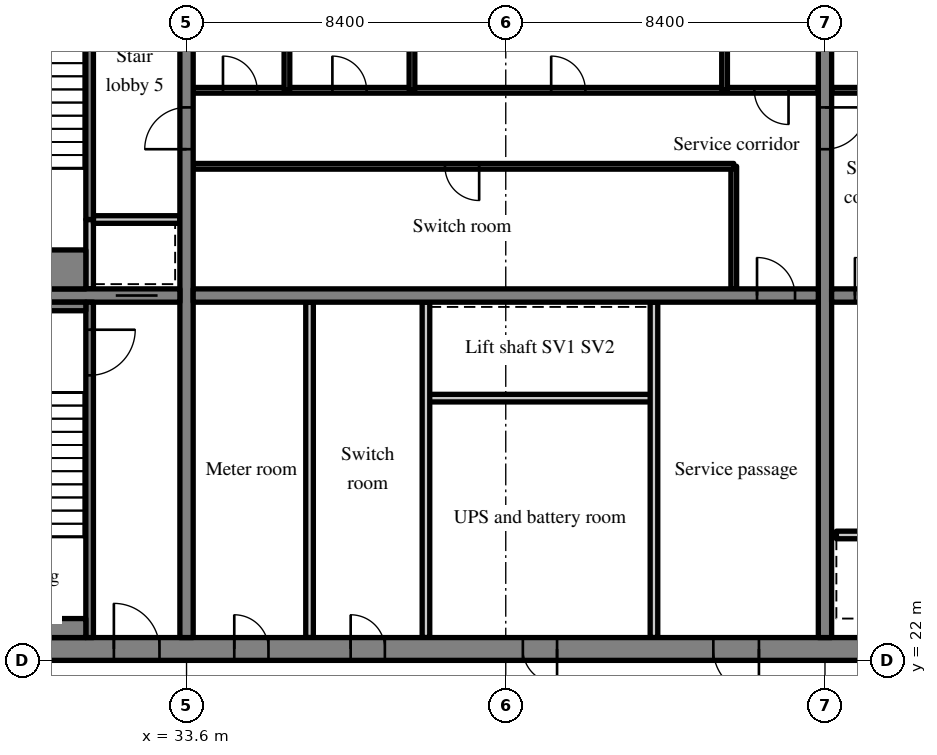
"""IFC4 building model, lengths in metres.
Left out: names, types, materials, properties, quantities, classifications, styles, units other than length and angle.
Written with IfcOpenShell. Run it as: python <this file> out.ifc"""

import sys

from ifc_helpers import new_model, si_unit, direction, frame, frame_2d, origin, place, context, subcontext, project, spatial, rectangle, extrude, source, transform, mapped, element, fill, save


model = new_model("IFC4")
c1 = context("Model", 3, precision=1e-05, world=origin(), true_north=direction((0.0, 1.0)))
c2 = subcontext(c1, "Body", "Model", "MODEL_VIEW")
j1 = project(units=[si_unit("LENGTHUNIT", "METRE"), si_unit("PLANEANGLEUNIT", "RADIAN")], contexts=[c1])
p1 = place(None, origin())
s1 = spatial("IfcSite", under=j1, at=p1, CompositionType="ELEMENT")
p2 = place(p1, origin())
s2 = spatial("IfcBuilding", under=s1, at=p2, CompositionType="ELEMENT")
p3 = place(p2, frame((0.0, 0.0, 206.4)))
s3 = spatial("IfcBuildingStorey", under=s2, at=p3, CompositionType="ELEMENT", Elevation=206.4)
m1 = source(origin(), c2, "Body", "SweptSolid", [
    extrude(rectangle(XDim=50.4, YDim=0.6, at=frame_2d((25.2, 0.0))), origin(), (0.0, 0.0, 1.0), 7.32),
])
p4 = place(p3, frame((25.2, 22.3, 0.0), z_axis=(0.0, 0.0, 1.0), x_axis=(1.0, 0.0, 0.0)))
e1 = element("IfcWall", 1, at=p4, inside=s3, PredefinedType="SHEAR", context=c2, shape_type="MappedRepresentation", body=[
    mapped(m1, transform((0.0, 0.0, 0.0), scale=1.0)),
])
m2 = source(origin(), c2, "Body", "SweptSolid", [
    extrude(rectangle(XDim=1.2, YDim=2.1, at=frame_2d((0.6, 1.05))), frame((0.0, 0.31, 0.0), z_axis=(0.0, -1.0, 0.0), x_axis=(1.0, 0.0, 0.0)), (0.0, 0.0, 1.0), 0.62),
])
p5 = place(p4, frame((22.262, 0.0, 0.0)))
e2 = element("IfcOpeningElement", 2, at=p5, cuts=e1, PredefinedType="OPENING", context=c2, shape_type="MappedRepresentation", body=[
    mapped(m2, transform((0.0, 0.0, 0.0), scale=1.0)),
])
m3 = source(origin(), c2, "Body", "SweptSolid", [
    extrude(rectangle(XDim=0.9, YDim=2.1, at=frame_2d((0.45, 1.05))), frame((0.0, 0.31, 0.0), z_axis=(0.0, -1.0, 0.0), x_axis=(1.0, 0.0, 0.0)), (0.0, 0.0, 1.0), 0.62),
])
p6 = place(p4, frame((17.25, 0.0, 0.0)))
e3 = element("IfcOpeningElement", 3, at=p6, cuts=e1, PredefinedType="OPENING", context=c2, shape_type="MappedRepresentation", body=[
    mapped(m3, transform((0.0, 0.0, 0.0), scale=1.0)),
])
p7 = place(p4, frame((9.656, 0.0, 0.0)))
e4 = element("IfcOpeningElement", 4, at=p7, cuts=e1, PredefinedType="OPENING", context=c2, shape_type="MappedRepresentation", body=[
    mapped(m3, transform((0.0, 0.0, 0.0), scale=1.0)),
])
p8 = place(p4, frame((12.719, 0.0, 0.0)))
e5 = element("IfcOpeningElement", 5, at=p8, cuts=e1, PredefinedType="OPENING", context=c2, shape_type="MappedRepresentation", body=[
    mapped(m3, transform((0.0, 0.0, 0.0), scale=1.0)),
])
m4 = source(origin(), c2, "Body", "SweptSolid", [
    extrude(rectangle(XDim=1.8, YDim=2.1, at=frame_2d((0.9, 1.05))), frame((0.0, 0.31, 0.0), z_axis=(0.0, -1.0, 0.0), x_axis=(1.0, 0.0, 0.0)), (0.0, 0.0, 1.0), 0.62),
])
p9 = place(p4, frame((32.7, 0.0, 0.0)))
e6 = element("IfcOpeningElement", 6, at=p9, cuts=e1, PredefinedType="OPENING", context=c2, shape_type="MappedRepresentation", body=[
    mapped(m4, transform((0.0, 0.0, 0.0), scale=1.0)),
])
p10 = place(p4, frame((6.488, 0.0, 0.0)))
e7 = element("IfcOpeningElement", 7, at=p10, cuts=e1, PredefinedType="OPENING", context=c2, shape_type="MappedRepresentation", body=[
    mapped(m2, transform((0.0, 0.0, 0.0), scale=1.0)),
])
p11 = place(p4, frame((47.925, 0.0, 0.0)))
e8 = element("IfcOpeningElement", 8, at=p11, cuts=e1, PredefinedType="OPENING", context=c2, shape_type="MappedRepresentation", body=[
    mapped(m2, transform((0.0, 0.0, 0.0), scale=1.0)),
])
m5 = source(origin(), c2, "Body", "SweptSolid", [
    extrude(rectangle(XDim=18.8, YDim=0.35, at=frame_2d((9.4, 0.0))), origin(), (0.0, 0.0, 1.0), 7.32),
])
p12 = place(p3, frame((33.6, 22.6, 0.0), z_axis=(0.0, 0.0, 1.0), x_axis=(0.0, 1.0, 0.0)))
e9 = element("IfcWall", 9, at=p12, inside=s3, PredefinedType="SHEAR", context=c2, shape_type="MappedRepresentation", body=[
    mapped(m5, transform((0.0, 0.0, 0.0), scale=1.0)),
])
m6 = source(origin(), c2, "Body", "SweptSolid", [
    extrude(rectangle(XDim=1.1, YDim=2.1, at=frame_2d((0.55, 1.05))), frame((0.0, 0.185, 0.0), z_axis=(0.0, -1.0, 0.0), x_axis=(1.0, 0.0, 0.0)), (0.0, 0.0, 1.0), 0.37),
])
p13 = place(p12, frame((12.85, 0.0, 0.0)))
e10 = element("IfcOpeningElement", 10, at=p13, cuts=e9, PredefinedType="OPENING", context=c2, shape_type="MappedRepresentation", body=[
    mapped(m6, transform((0.0, 0.0, 0.0), scale=1.0)),
])
p14 = place(p3, frame((50.4, 22.6, 0.0), z_axis=(0.0, 0.0, 1.0), x_axis=(0.0, 1.0, 0.0)))
e11 = element("IfcWall", 11, at=p14, inside=s3, PredefinedType="SHEAR", context=c2, shape_type="MappedRepresentation", body=[
    mapped(m5, transform((0.0, 0.0, 0.0), scale=1.0)),
])
p15 = place(p14, frame((12.85, 0.0, 0.0)))
e12 = element("IfcOpeningElement", 12, at=p15, cuts=e11, PredefinedType="OPENING", context=c2, shape_type="MappedRepresentation", body=[
    mapped(m6, transform((0.0, 0.0, 0.0), scale=1.0)),
])
m7 = source(origin(), c2, "Body", "SweptSolid", [
    extrude(rectangle(XDim=7.625, YDim=0.35, at=frame_2d((3.812, 0.0))), origin(), (0.0, 0.0, 1.0), 7.32),
])
p16 = place(p3, frame((25.8, 31.6, 0.0), z_axis=(0.0, 0.0, 1.0), x_axis=(1.0, 0.0, 0.0)))
e13 = element("IfcWall", 13, at=p16, inside=s3, PredefinedType="SHEAR", context=c2, shape_type="MappedRepresentation", body=[
    mapped(m7, transform((0.0, 0.0, 0.0), scale=1.0)),
])
p17 = place(p16, frame((5.938, 0.0, 0.0)))
e14 = element("IfcOpeningElement", 14, at=p17, cuts=e13, PredefinedType="OPENING", context=c2, shape_type="MappedRepresentation", body=[
    mapped(m6, transform((0.0, 0.0, 0.0), scale=1.0)),
])
m8 = source(origin(), c2, "Body", "SweptSolid", [
    extrude(rectangle(XDim=16.45, YDim=0.35, at=frame_2d((8.225, 0.0))), origin(), (0.0, 0.0, 1.0), 7.32),
])
p18 = place(p3, frame((33.775, 31.6, 0.0), z_axis=(0.0, 0.0, 1.0), x_axis=(1.0, 0.0, 0.0)))
e15 = element("IfcWall", 15, at=p18, inside=s3, PredefinedType="SHEAR", context=c2, shape_type="MappedRepresentation", body=[
    mapped(m8, transform((0.0, 0.0, 0.0), scale=1.0)),
])
m9 = source(origin(), c2, "Body", "SweptSolid", [
    extrude(rectangle(XDim=1.0, YDim=2.1, at=frame_2d((0.5, 1.05))), frame((0.0, 0.185, 0.0), z_axis=(0.0, -1.0, 0.0), x_axis=(1.0, 0.0, 0.0)), (0.0, 0.0, 1.0), 0.37),
])
p19 = place(p18, frame((14.837, 0.0, 0.0)))
e16 = element("IfcOpeningElement", 16, at=p19, cuts=e15, PredefinedType="OPENING", context=c2, shape_type="MappedRepresentation", body=[
    mapped(m9, transform((0.0, 0.0, 0.0), scale=1.0)),
])
m10 = source(origin(), c2, "Body", "SweptSolid", [
    extrude(rectangle(XDim=16.45, YDim=0.35, at=frame_2d((8.225, 0.0))), origin(), (0.0, 0.0, 1.0), 7.32),
])
p20 = place(p3, frame((50.575, 31.6, 0.0), z_axis=(0.0, 0.0, 1.0), x_axis=(1.0, 0.0, 0.0)))
e17 = element("IfcWall", 17, at=p20, inside=s3, PredefinedType="SHEAR", context=c2, shape_type="MappedRepresentation", body=[
    mapped(m10, transform((0.0, 0.0, 0.0), scale=1.0)),
])
p21 = place(p20, frame((0.613, 0.0, 0.0)))
e18 = element("IfcOpeningElement", 18, at=p21, cuts=e17, PredefinedType="OPENING", context=c2, shape_type="MappedRepresentation", body=[
    mapped(m9, transform((0.0, 0.0, 0.0), scale=1.0)),
])
m11 = source(origin(), c2, "Body", "SweptSolid", [
    extrude(rectangle(XDim=6.0, YDim=0.2, at=frame_2d((3.0, 0.0))), origin(), (0.0, 0.0, 1.0), 7.32),
])
p22 = place(p3, frame((39.9, 28.9, 0.0), z_axis=(0.0, 0.0, 1.0), x_axis=(1.0, 0.0, 0.0)))
e19 = element("IfcWall", 19, at=p22, inside=s3, PredefinedType="SOLIDWALL", context=c2, shape_type="MappedRepresentation", body=[
    mapped(m11, transform((0.0, 0.0, 0.0), scale=1.0)),
])
m12 = source(origin(), c2, "Body", "SweptSolid", [
    extrude(rectangle(XDim=8.825, YDim=0.2, at=frame_2d((4.413, 0.0))), origin(), (0.0, 0.0, 1.0), 7.32),
])
for number, where, z_axis, x_axis in (
    (20, (45.9, 22.6, 0.0), (0.0, 0.0, 1.0), (0.0, 1.0, 0.0)),
    (21, (39.9, 22.6, 0.0), (0.0, 0.0, 1.0), (0.0, 1.0, 0.0)),
    (22, (36.837, 22.6, 0.0), (0.0, 0.0, 1.0), (0.0, 1.0, 0.0)),
):
    element("IfcWall", number, at=place(p3, frame(where, z_axis=z_axis, x_axis=x_axis)), inside=s3, PredefinedType="PARTITIONING", context=c2, shape_type="MappedRepresentation", body=[
        mapped(m12, transform((0.0, 0.0, 0.0), scale=1.0)),
    ])
m13 = source(origin(), c2, "Body", "SweptSolid", [
    extrude(rectangle(XDim=3.225, YDim=0.15, at=frame_2d((1.613, 0.0))), origin(), (0.0, 0.0, 1.0), 7.32),
])
p23 = place(p3, frame((48.0, 31.775, 0.0), z_axis=(0.0, 0.0, 1.0), x_axis=(0.0, 1.0, 0.0)))
e23 = element("IfcWall", 23, at=p23, inside=s3, PredefinedType="PARTITIONING", context=c2, shape_type="MappedRepresentation", body=[
    mapped(m13, transform((0.0, 0.0, 0.0), scale=1.0)),
])
m14 = source(origin(), c2, "Body", "SweptSolid", [
    extrude(rectangle(XDim=14.225, YDim=0.15, at=frame_2d((7.113, 0.0))), origin(), (0.0, 0.0, 1.0), 7.32),
])
p24 = place(p3, frame((33.775, 35.0, 0.0), z_axis=(0.0, 0.0, 1.0), x_axis=(1.0, 0.0, 0.0)))
e24 = element("IfcWall", 24, at=p24, inside=s3, PredefinedType="PARTITIONING", context=c2, shape_type="MappedRepresentation", body=[
    mapped(m14, transform((0.0, 0.0, 0.0), scale=1.0)),
])
m15 = source(origin(), c2, "Body", "SweptSolid", [
    extrude(rectangle(XDim=0.9, YDim=2.1, at=frame_2d((0.45, 1.05))), frame((0.0, 0.085, 0.0), z_axis=(0.0, -1.0, 0.0), x_axis=(1.0, 0.0, 0.0)), (0.0, 0.0, 1.0), 0.17),
])
p25 = place(p24, frame((6.625, 0.0, 0.0)))
e25 = element("IfcOpeningElement", 25, at=p25, cuts=e24, PredefinedType="OPENING", context=c2, shape_type="MappedRepresentation", body=[
    mapped(m15, transform((0.0, 0.0, 0.0), scale=1.0)),
])
m16 = source(origin(), c2, "Body", "SweptSolid", [
    extrude(rectangle(XDim=16.45, YDim=0.15, at=frame_2d((8.225, 0.0))), origin(), (0.0, 0.0, 1.0), 7.32),
])
p26 = place(p3, frame((33.775, 37.0, 0.0), z_axis=(0.0, 0.0, 1.0), x_axis=(1.0, 0.0, 0.0)))
e26 = element("IfcWall", 26, at=p26, inside=s3, PredefinedType="PARTITIONING", context=c2, shape_type="MappedRepresentation", body=[
    mapped(m16, transform((0.0, 0.0, 0.0), scale=1.0)),
])
p27 = place(p26, frame((0.784, 0.0, 0.0)))
e27 = element("IfcOpeningElement", 27, at=p27, cuts=e26, PredefinedType="OPENING", context=c2, shape_type="MappedRepresentation", body=[
    mapped(m15, transform((0.0, 0.0, 0.0), scale=1.0)),
])
p28 = place(p26, frame((3.663, 0.0, 0.0)))
e28 = element("IfcOpeningElement", 28, at=p28, cuts=e26, PredefinedType="OPENING", context=c2, shape_type="MappedRepresentation", body=[
    mapped(m15, transform((0.0, 0.0, 0.0), scale=1.0)),
])
p29 = place(p26, frame((9.42, 0.0, 0.0)))
e29 = element("IfcOpeningElement", 29, at=p29, cuts=e26, PredefinedType="OPENING", context=c2, shape_type="MappedRepresentation", body=[
    mapped(m15, transform((0.0, 0.0, 0.0), scale=1.0)),
])
p30 = place(p26, frame((14.766, 0.0, 0.0)))
e30 = element("IfcOpeningElement", 30, at=p30, cuts=e26, PredefinedType="OPENING", context=c2, shape_type="MappedRepresentation", body=[
    mapped(m15, transform((0.0, 0.0, 0.0), scale=1.0)),
])
m17 = source(origin(), c2, "Body", "SweptSolid", [
    extrude(rectangle(XDim=4.4, YDim=0.15, at=frame_2d((2.2, 0.0))), origin(), (0.0, 0.0, 1.0), 7.32),
])
for number, where, z_axis, x_axis in (
    (31, (36.242, 37.0, 0.0), (0.0, 0.0, 1.0), (0.0, 1.0, 0.0)),
    (32, (39.532, 37.0, 0.0), (0.0, 0.0, 1.0), (0.0, 1.0, 0.0)),
    (33, (47.758, 37.0, 0.0), (0.0, 0.0, 1.0), (0.0, 1.0, 0.0)),
):
    element("IfcWall", number, at=place(p3, frame(where, z_axis=z_axis, x_axis=x_axis)), inside=s3, PredefinedType="PARTITIONING", context=c2, shape_type="MappedRepresentation", body=[
        mapped(m17, transform((0.0, 0.0, 0.0), scale=1.0)),
    ])
p31 = place(p3, frame((56.7, 25.3, 0.0), z_axis=(0.0, 0.0, 1.0), x_axis=(-1.0, 0.0, 0.0)))
e34 = element("IfcWall", 34, at=p31, inside=s3, PredefinedType="SOLIDWALL", context=c2, shape_type="MappedRepresentation", body=[
    mapped(m11, transform((0.0, 0.0, 0.0), scale=1.0)),
])
m18 = source(origin(), c2, "Body", "SweptSolid", [
    extrude(rectangle(XDim=16.45, YDim=0.15, at=frame_2d((8.225, 0.0))), origin(), (0.0, 0.0, 1.0), 7.32),
])
p32 = place(p3, frame((67.025, 37.0, 0.0), z_axis=(0.0, 0.0, 1.0), x_axis=(-1.0, 0.0, 0.0)))
e35 = element("IfcWall", 35, at=p32, inside=s3, PredefinedType="PARTITIONING", context=c2, shape_type="MappedRepresentation", body=[
    mapped(m18, transform((0.0, 0.0, 0.0), scale=1.0)),
])
p33 = place(p32, frame((6.541, 0.0, 0.0)))
e36 = element("IfcOpeningElement", 36, at=p33, cuts=e35, PredefinedType="OPENING", context=c2, shape_type="MappedRepresentation", body=[
    mapped(m15, transform((0.0, 0.0, 0.0), scale=1.0)),
])
p34 = place(p32, frame((14.766, 0.0, 0.0)))
e37 = element("IfcOpeningElement", 37, at=p34, cuts=e35, PredefinedType="OPENING", context=c2, shape_type="MappedRepresentation", body=[
    mapped(m15, transform((0.0, 0.0, 0.0), scale=1.0)),
])
m19 = source(origin(), c2, "Body", "SweptSolid", [
    extrude(rectangle(XDim=8.825, YDim=0.2, at=frame_2d((4.413, 0.0))), origin(), (0.0, 0.0, 1.0), 7.32),
])
p35 = place(p3, frame((31.05, 22.6, 0.0), z_axis=(0.0, 0.0, 1.0), x_axis=(0.0, 1.0, 0.0)))
e38 = element("IfcWall", 38, at=p35, inside=s3, PredefinedType="SOLIDWALL", context=c2, shape_type="MappedRepresentation", body=[
    mapped(m19, transform((0.0, 0.0, 0.0), scale=1.0)),
])
m20 = source(origin(), c2, "Body", "SweptSolid", [
    extrude(rectangle(XDim=1.2, YDim=2.1, at=frame_2d((0.6, 1.05))), frame((0.0, 0.11, 0.0), z_axis=(0.0, -1.0, 0.0), x_axis=(1.0, 0.0, 0.0)), (0.0, 0.0, 1.0), 0.22),
])
p36 = place(p35, frame((6.9, 0.0, 0.0)))
e39 = element("IfcOpeningElement", 39, at=p36, cuts=e38, PredefinedType="OPENING", context=c2, shape_type="MappedRepresentation", body=[
    mapped(m20, transform((0.0, 0.0, 0.0), scale=1.0)),
])
m21 = source(origin(), c2, "Body", "SweptSolid", [
    extrude(rectangle(XDim=1.825, YDim=0.2, at=frame_2d((0.913, 0.0))), origin(), (0.0, 0.0, 1.0), 7.32),
])
p37 = place(p3, frame((31.05, 31.775, 0.0), z_axis=(0.0, 0.0, 1.0), x_axis=(0.0, 1.0, 0.0)))
e40 = element("IfcWall", 40, at=p37, inside=s3, PredefinedType="SOLIDWALL", context=c2, shape_type="MappedRepresentation", body=[
    mapped(m21, transform((0.0, 0.0, 0.0), scale=1.0)),
])
m22 = source(origin(), c2, "Body", "SweptSolid", [
    extrude(rectangle(XDim=2.275, YDim=0.2, at=frame_2d((1.138, 0.0))), origin(), (0.0, 0.0, 1.0), 7.32),
])
p38 = place(p3, frame((31.15, 33.6, 0.0), z_axis=(0.0, 0.0, 1.0), x_axis=(1.0, 0.0, 0.0)))
e41 = element("IfcWall", 41, at=p38, inside=s3, PredefinedType="SOLIDWALL", context=c2, shape_type="MappedRepresentation", body=[
    mapped(m22, transform((0.0, 0.0, 0.0), scale=1.0)),
])
m23 = source(origin(), c2, "Body", "SweptSolid", [
    extrude(rectangle(XDim=7.8, YDim=0.2, at=frame_2d((3.9, 0.0))), origin(), (0.0, 0.0, 1.0), 7.32),
])
p39 = place(p3, frame((31.05, 33.6, 0.0), z_axis=(0.0, 0.0, 1.0), x_axis=(0.0, 1.0, 0.0)))
e42 = element("IfcWall", 42, at=p39, inside=s3, PredefinedType="SOLIDWALL", context=c2, shape_type="MappedRepresentation", body=[
    mapped(m23, transform((0.0, 0.0, 0.0), scale=1.0)),
])
m24 = source(origin(), c2, "Body", "SweptSolid", [
    extrude(rectangle(XDim=1.8, YDim=2.1, at=frame_2d((0.9, 1.05))), frame((0.0, 0.11, 0.0), z_axis=(0.0, -1.0, 0.0), x_axis=(1.0, 0.0, 0.0)), (0.0, 0.0, 1.0), 0.22),
])
p40 = place(p39, frame((5.3, 0.0, 0.0)))
e43 = element("IfcOpeningElement", 43, at=p40, cuts=e42, PredefinedType="OPENING", context=c2, shape_type="MappedRepresentation", body=[
    mapped(m24, transform((0.0, 0.0, 0.0), scale=1.0)),
])
m25 = source(origin(), c2, "Body", "SweptSolid", [
    extrude(rectangle(XDim=5.15, YDim=0.5, at=frame_2d((2.575, 0.0))), origin(), (0.0, 0.0, 1.0), 7.32),
])
p41 = place(p3, frame((25.8, 22.85, 0.0), z_axis=(0.0, 0.0, 1.0), x_axis=(1.0, 0.0, 0.0)))
e44 = element("IfcWall", 44, at=p41, inside=s3, PredefinedType="SOLIDWALL", context=c2, shape_type="MappedRepresentation", body=[
    mapped(m25, transform((0.0, 0.0, 0.0), scale=1.0)),
])
m26 = source(origin(), c2, "Body", "SweptSolid", [
    extrude(rectangle(XDim=5.15, YDim=0.225, at=frame_2d((2.575, 0.0))), origin(), (0.0, 0.0, 1.0), 7.32),
])
p42 = place(p3, frame((25.8, 31.312, 0.0), z_axis=(0.0, 0.0, 1.0), x_axis=(1.0, 0.0, 0.0)))
e45 = element("IfcWall", 45, at=p42, inside=s3, PredefinedType="SOLIDWALL", context=c2, shape_type="MappedRepresentation", body=[
    mapped(m26, transform((0.0, 0.0, 0.0), scale=1.0)),
])
m27 = source(origin(), c2, "Body", "SweptSolid", [
    extrude(rectangle(XDim=5.15, YDim=1.025, at=frame_2d((2.575, 0.0))), origin(), (0.0, 0.0, 1.0), 7.32),
])
p43 = place(p3, frame((25.8, 32.287, 0.0), z_axis=(0.0, 0.0, 1.0), x_axis=(1.0, 0.0, 0.0)))
e46 = element("IfcWall", 46, at=p43, inside=s3, PredefinedType="SOLIDWALL", context=c2, shape_type="MappedRepresentation", body=[
    mapped(m27, transform((0.0, 0.0, 0.0), scale=1.0)),
])
m28 = source(origin(), c2, "Body", "SweptSolid", [
    extrude(rectangle(XDim=1.2, YDim=2.1, at=frame_2d((0.6, 1.05))), frame((0.0, 0.225, 0.0), z_axis=(0.0, -1.0, 0.0), x_axis=(1.0, 0.0, 0.0)), (0.0, 0.0, 1.0), 0.05),
])
p44 = place(p5, origin())
e47 = element("IfcDoor", 47, at=p44, inside=s3, OperationType="SINGLE_SWING_RIGHT", PredefinedType="DOOR", context=c2, shape_type="MappedRepresentation", body=[
    mapped(m28, transform((0.0, 0.0, 0.0), scale=1.0)),
])
fill(e2, e47)
m29 = source(origin(), c2, "Body", "SweptSolid", [
    extrude(rectangle(XDim=1.0, YDim=2.1, at=frame_2d((0.5, 1.05))), frame((0.0, 0.025, 0.0), z_axis=(0.0, -1.0, 0.0), x_axis=(1.0, 0.0, 0.0)), (0.0, 0.0, 1.0), 0.05),
])
p45 = place(p19, origin())
e48 = element("IfcDoor", 48, at=p45, inside=s3, OperationType="SINGLE_SWING_LEFT", PredefinedType="DOOR", context=c2, shape_type="MappedRepresentation", body=[
    mapped(m29, transform((0.0, 0.0, 0.0), scale=1.0)),
])
fill(e16, e48)
m30 = source(origin(), c2, "Body", "SweptSolid", [
    extrude(rectangle(XDim=0.9, YDim=2.1, at=frame_2d((0.45, 1.05))), frame((0.0, 0.225, 0.0), z_axis=(0.0, -1.0, 0.0), x_axis=(1.0, 0.0, 0.0)), (0.0, 0.0, 1.0), 0.05),
])
p46 = place(p6, origin())
e49 = element("IfcDoor", 49, at=p46, inside=s3, OperationType="SINGLE_SWING_RIGHT", PredefinedType="DOOR", context=c2, shape_type="MappedRepresentation", body=[
    mapped(m30, transform((0.0, 0.0, 0.0), scale=1.0)),
])
fill(e3, e49)
p47 = place(p7, origin())
e50 = element("IfcDoor", 50, at=p47, inside=s3, OperationType="SINGLE_SWING_LEFT", PredefinedType="DOOR", context=c2, shape_type="MappedRepresentation", body=[
    mapped(m30, transform((0.0, 0.0, 0.0), scale=1.0)),
])
fill(e4, e50)
p48 = place(p8, origin())
e51 = element("IfcDoor", 51, at=p48, inside=s3, OperationType="SINGLE_SWING_LEFT", PredefinedType="DOOR", context=c2, shape_type="MappedRepresentation", body=[
    mapped(m30, transform((0.0, 0.0, 0.0), scale=1.0)),
])
fill(e5, e51)
m31 = source(origin(), c2, "Body", "SweptSolid", [
    extrude(rectangle(XDim=0.9, YDim=2.1, at=frame_2d((0.45, 1.05))), frame((0.0, 0.025, 0.0), z_axis=(0.0, -1.0, 0.0), x_axis=(1.0, 0.0, 0.0)), (0.0, 0.0, 1.0), 0.05),
])
p49 = place(p25, origin())
e52 = element("IfcDoor", 52, at=p49, inside=s3, OperationType="SINGLE_SWING_RIGHT", PredefinedType="DOOR", context=c2, shape_type="MappedRepresentation", body=[
    mapped(m31, transform((0.0, 0.0, 0.0), scale=1.0)),
])
fill(e25, e52)
p50 = place(p27, origin())
e53 = element("IfcDoor", 53, at=p50, inside=s3, OperationType="SINGLE_SWING_LEFT", PredefinedType="DOOR", context=c2, shape_type="MappedRepresentation", body=[
    mapped(m31, transform((0.0, 0.0, 0.0), scale=1.0)),
])
fill(e27, e53)
p51 = place(p28, origin())
e54 = element("IfcDoor", 54, at=p51, inside=s3, OperationType="SINGLE_SWING_LEFT", PredefinedType="DOOR", context=c2, shape_type="MappedRepresentation", body=[
    mapped(m31, transform((0.0, 0.0, 0.0), scale=1.0)),
])
fill(e28, e54)
p52 = place(p29, origin())
e55 = element("IfcDoor", 55, at=p52, inside=s3, OperationType="SINGLE_SWING_LEFT", PredefinedType="DOOR", context=c2, shape_type="MappedRepresentation", body=[
    mapped(m31, transform((0.0, 0.0, 0.0), scale=1.0)),
])
fill(e29, e55)
p53 = place(p30, origin())
e56 = element("IfcDoor", 56, at=p53, inside=s3, OperationType="SINGLE_SWING_RIGHT", PredefinedType="DOOR", context=c2, shape_type="MappedRepresentation", body=[
    mapped(m31, transform((0.0, 0.0, 0.0), scale=1.0)),
])
fill(e30, e56)
p54 = place(p21, origin())
e57 = element("IfcDoor", 57, at=p54, inside=s3, OperationType="SINGLE_SWING_LEFT", PredefinedType="DOOR", context=c2, shape_type="MappedRepresentation", body=[
    mapped(m29, transform((0.0, 0.0, 0.0), scale=1.0)),
])
fill(e18, e57)
m32 = source(origin(), c2, "Body", "SweptSolid", [
    extrude(rectangle(XDim=1.2, YDim=2.1, at=frame_2d((0.6, 1.05))), frame((0.0, 0.025, 0.0), z_axis=(0.0, -1.0, 0.0), x_axis=(1.0, 0.0, 0.0)), (0.0, 0.0, 1.0), 0.05),
])
p55 = place(p36, origin())
e58 = element("IfcDoor", 58, at=p55, inside=s3, OperationType="SINGLE_SWING_RIGHT", PredefinedType="DOOR", context=c2, shape_type="MappedRepresentation", body=[
    mapped(m32, transform((0.0, 0.0, 0.0), scale=1.0)),
])
fill(e39, e58)
p56 = place(p10, origin())
e59 = element("IfcDoor", 59, at=p56, inside=s3, OperationType="SINGLE_SWING_LEFT", PredefinedType="DOOR", context=c2, shape_type="MappedRepresentation", body=[
    mapped(m28, transform((0.0, 0.0, 0.0), scale=1.0)),
])
fill(e7, e59)
m33 = source(origin(), c2, "Body", "SweptSolid", [
    extrude(rectangle(XDim=1.1, YDim=2.1, at=frame_2d((0.55, 1.05))), frame((0.0, 0.025, 0.0), z_axis=(0.0, -1.0, 0.0), x_axis=(1.0, 0.0, 0.0)), (0.0, 0.0, 1.0), 0.05),
])
p57 = place(p17, origin())
e60 = element("IfcDoor", 60, at=p57, inside=s3, OperationType="SLIDING_TO_LEFT", PredefinedType="DOOR", context=c2, shape_type="MappedRepresentation", body=[
    mapped(m33, transform((0.0, 0.0, 0.0), scale=1.0)),
])
fill(e14, e60)
p58 = place(p13, origin())
e61 = element("IfcDoor", 61, at=p58, inside=s3, OperationType="SINGLE_SWING_LEFT", PredefinedType="DOOR", context=c2, shape_type="MappedRepresentation", body=[
    mapped(m33, transform((0.0, 0.0, 0.0), scale=1.0)),
])
fill(e10, e61)
p59 = place(p15, origin())
e62 = element("IfcDoor", 62, at=p59, inside=s3, OperationType="SINGLE_SWING_RIGHT", PredefinedType="DOOR", context=c2, shape_type="MappedRepresentation", body=[
    mapped(m33, transform((0.0, 0.0, 0.0), scale=1.0)),
])
fill(e12, e62)
save(model, sys.argv[1])
